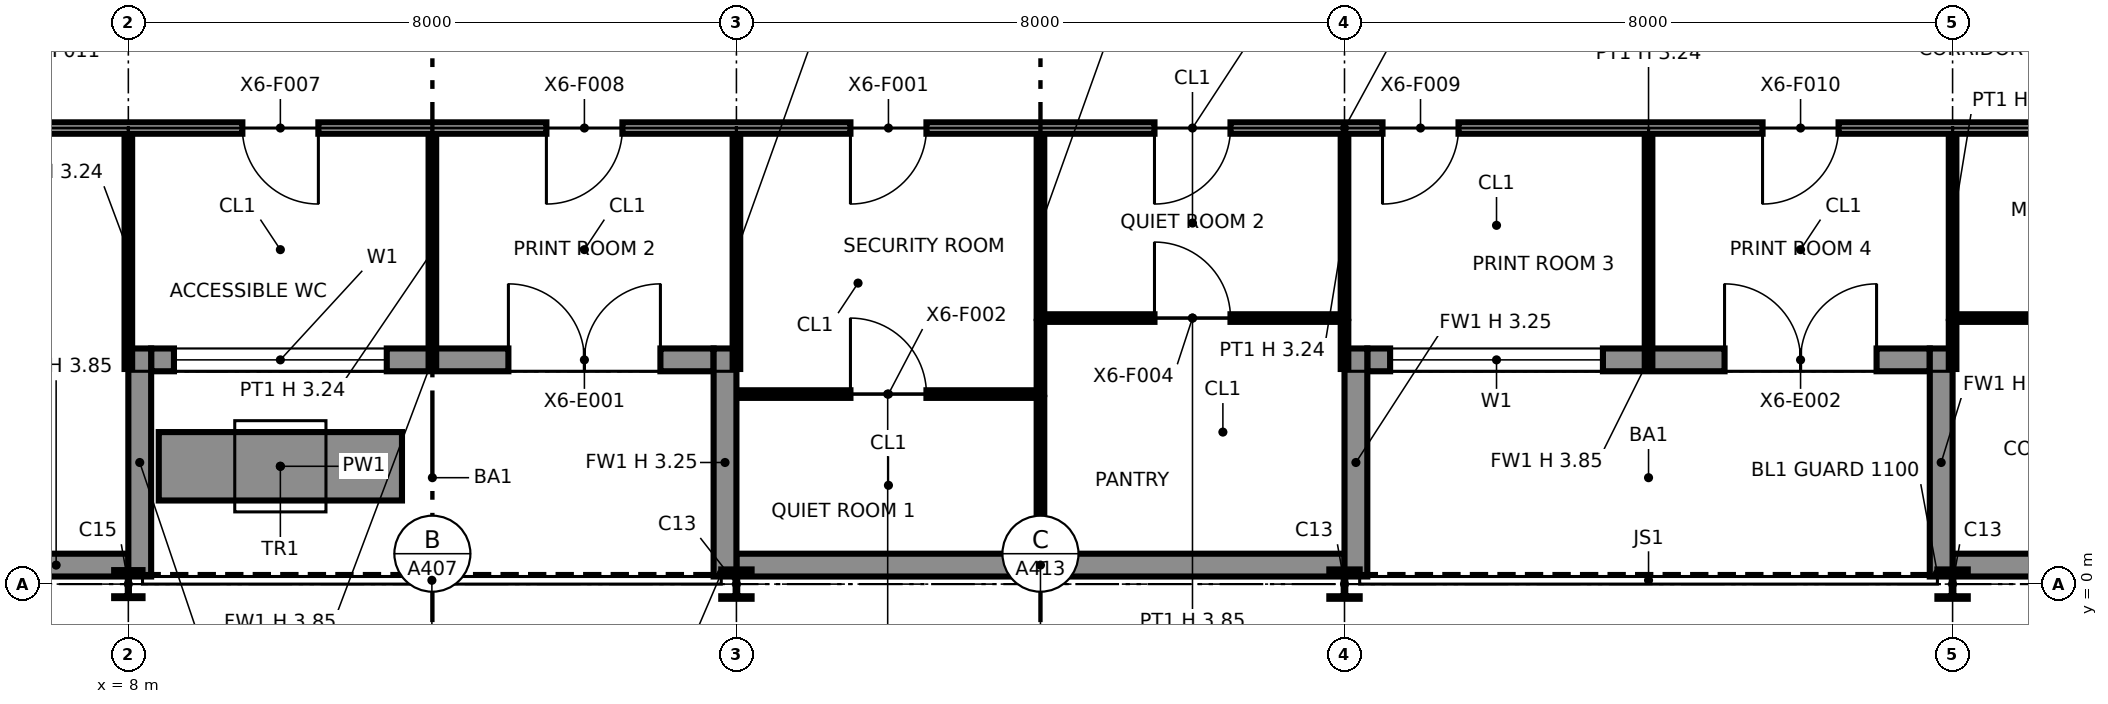
"""IFC4 building model, lengths in metres.
Left out: names, types, materials, properties, quantities, classifications, styles, units other than length and angle.
Written with IfcOpenShell. Run it as: python <this file> out.ifc"""

import sys

from ifc_helpers import new_model, si_unit, direction, frame, frame_2d, origin, origin_2d, place, context, subcontext, project, spatial, rectangle, i_section, extrude, element, fill, save


model = new_model("IFC4")
c1 = context("Model", 3, precision=1e-05, world=origin(), true_north=direction((0.0, 1.0)))
c2 = subcontext(c1, "Body", "Model", "MODEL_VIEW")
j1 = project(units=[si_unit("LENGTHUNIT", "METRE"), si_unit("PLANEANGLEUNIT", "RADIAN")], contexts=[c1])
p1 = place(None, origin())
s1 = spatial("IfcSite", under=j1, at=p1, CompositionType="ELEMENT")
p2 = place(p1, origin())
s2 = spatial("IfcBuilding", under=s1, at=p2, CompositionType="ELEMENT")
p3 = place(p2, frame((0.0, 0.0, 291.0)))
s3 = spatial("IfcBuildingStorey", under=s2, at=p3, CompositionType="ELEMENT", Elevation=291.0)
p4 = place(p3, frame((8.0, 0.0, 0.0), z_axis=(0.0, 0.0, 1.0), x_axis=(1.0, 0.0, 0.0)))
e1 = element("IfcColumn", 1, at=p4, inside=s3, PredefinedType="COLUMN", context=c2, shape_type="SweptSolid", body=[
    extrude(i_section(OverallWidth=0.373, OverallDepth=0.368, WebThickness=0.015, FlangeThickness=0.024, at=origin_2d()), origin(), (0.0, 0.0, 1.0), 3.85),
])
for number, where, z_axis, x_axis in (
    (2, (16.0, 0.0, 0.0), (0.0, 0.0, 1.0), (1.0, 0.0, 0.0)),
    (3, (24.0, 0.0, 0.0), (0.0, 0.0, 1.0), (1.0, 0.0, 0.0)),
    (4, (32.0, 0.0, 0.0), (0.0, 0.0, 1.0), (1.0, 0.0, 0.0)),
):
    element("IfcColumn", number, at=place(p3, frame(where, z_axis=z_axis, x_axis=x_axis)), inside=s3, PredefinedType="COLUMN", context=c2, shape_type="SweptSolid", body=[
        extrude(i_section(OverallWidth=0.399, OverallDepth=0.386, WebThickness=0.021, FlangeThickness=0.033, at=origin_2d()), origin(), (0.0, 0.0, 1.0), 3.85),
    ])
p5 = place(p3, frame((6.1, 0.25, 0.0), z_axis=(0.0, 0.0, 1.0), x_axis=(1.0, 0.0, 0.0)))
e5 = element("IfcWall", 5, at=p5, inside=s3, PredefinedType="SOLIDWALL", context=c2, shape_type="SweptSolid", body=[
    extrude(rectangle(XDim=1.9, YDim=0.3, at=frame_2d((0.95, 0.0))), origin(), (0.0, 0.0, 1.0), 3.85),
])
p6 = place(p3, frame((8.3, 2.95, 0.0), z_axis=(0.0, 0.0, 1.0), x_axis=(1.0, 0.0, 0.0)))
e6 = element("IfcWall", 6, at=p6, inside=s3, PredefinedType="SOLIDWALL", context=c2, shape_type="SweptSolid", body=[
    extrude(rectangle(XDim=7.4, YDim=0.3, at=frame_2d((3.7, 0.0))), origin(), (0.0, 0.0, 1.0), 3.85),
])
p7 = place(p6, frame((0.3, 0.0, 0.9)))
e7 = element("IfcOpeningElement", 7, at=p7, cuts=e6, PredefinedType="OPENING", context=c2, shape_type="SweptSolid", body=[
    extrude(rectangle(XDim=2.8, YDim=2.2, at=frame_2d((1.4, 1.1))), frame((0.0, 0.16, 0.0), z_axis=(0.0, -1.0, 0.0), x_axis=(1.0, 0.0, 0.0)), (0.0, 0.0, 1.0), 0.32),
])
p8 = place(p6, frame((4.7, 0.0, 0.0)))
e8 = element("IfcOpeningElement", 8, at=p8, cuts=e6, PredefinedType="OPENING", context=c2, shape_type="SweptSolid", body=[
    extrude(rectangle(XDim=2.0, YDim=2.4, at=frame_2d((1.0, 1.2))), frame((0.0, 0.16, 0.0), z_axis=(0.0, -1.0, 0.0), x_axis=(1.0, 0.0, 0.0)), (0.0, 0.0, 1.0), 0.32),
])
p9 = place(p3, frame((8.15, 0.1, 0.0), z_axis=(0.0, 0.0, 1.0), x_axis=(0.0, 1.0, 0.0)))
e9 = element("IfcWall", 9, at=p9, inside=s3, PredefinedType="SOLIDWALL", context=c2, shape_type="SweptSolid", body=[
    extrude(rectangle(XDim=3.0, YDim=0.3, at=frame_2d((1.5, 0.0))), origin(), (0.0, 0.0, 1.0), 3.237),
])
p10 = place(p3, frame((15.85, 0.1, 0.0), z_axis=(0.0, 0.0, 1.0), x_axis=(0.0, 1.0, 0.0)))
e10 = element("IfcWall", 10, at=p10, inside=s3, PredefinedType="SOLIDWALL", context=c2, shape_type="SweptSolid", body=[
    extrude(rectangle(XDim=3.0, YDim=0.3, at=frame_2d((1.5, 0.0))), origin(), (0.0, 0.0, 1.0), 3.247),
])
p11 = place(p3, frame((16.0, 0.25, 0.0), z_axis=(0.0, 0.0, 1.0), x_axis=(1.0, 0.0, 0.0)))
e11 = element("IfcWall", 11, at=p11, inside=s3, PredefinedType="SOLIDWALL", context=c2, shape_type="SweptSolid", body=[
    extrude(rectangle(XDim=8.0, YDim=0.3, at=frame_2d((4.0, 0.0))), origin(), (0.0, 0.0, 1.0), 3.85),
])
p12 = place(p3, frame((24.3, 2.95, 0.0), z_axis=(0.0, 0.0, 1.0), x_axis=(1.0, 0.0, 0.0)))
e12 = element("IfcWall", 12, at=p12, inside=s3, PredefinedType="SOLIDWALL", context=c2, shape_type="SweptSolid", body=[
    extrude(rectangle(XDim=7.4, YDim=0.3, at=frame_2d((3.7, 0.0))), origin(), (0.0, 0.0, 1.0), 3.85),
])
p13 = place(p12, frame((0.3, 0.0, 0.9)))
e13 = element("IfcOpeningElement", 13, at=p13, cuts=e12, PredefinedType="OPENING", context=c2, shape_type="SweptSolid", body=[
    extrude(rectangle(XDim=2.8, YDim=2.2, at=frame_2d((1.4, 1.1))), frame((0.0, 0.16, 0.0), z_axis=(0.0, -1.0, 0.0), x_axis=(1.0, 0.0, 0.0)), (0.0, 0.0, 1.0), 0.32),
])
p14 = place(p12, frame((4.7, 0.0, 0.0)))
e14 = element("IfcOpeningElement", 14, at=p14, cuts=e12, PredefinedType="OPENING", context=c2, shape_type="SweptSolid", body=[
    extrude(rectangle(XDim=2.0, YDim=2.4, at=frame_2d((1.0, 1.2))), frame((0.0, 0.16, 0.0), z_axis=(0.0, -1.0, 0.0), x_axis=(1.0, 0.0, 0.0)), (0.0, 0.0, 1.0), 0.32),
])
for number, where, z_axis, x_axis in (
    (15, (24.15, 0.1, 0.0), (0.0, 0.0, 1.0), (0.0, 1.0, 0.0)),
    (16, (31.85, 0.1, 0.0), (0.0, 0.0, 1.0), (0.0, 1.0, 0.0)),
):
    element("IfcWall", number, at=place(p3, frame(where, z_axis=z_axis, x_axis=x_axis)), inside=s3, PredefinedType="SOLIDWALL", context=c2, shape_type="SweptSolid", body=[
        extrude(rectangle(XDim=3.0, YDim=0.3, at=frame_2d((1.5, 0.0))), origin(), (0.0, 0.0, 1.0), 3.247),
    ])
p15 = place(p3, frame((32.0, 0.25, 0.0), z_axis=(0.0, 0.0, 1.0), x_axis=(1.0, 0.0, 0.0)))
e17 = element("IfcWall", 17, at=p15, inside=s3, PredefinedType="SOLIDWALL", context=c2, shape_type="SweptSolid", body=[
    extrude(rectangle(XDim=9.9, YDim=0.3, at=frame_2d((4.95, 0.0))), origin(), (0.0, 0.0, 1.0), 3.85),
])
p16 = place(p3, frame((8.4, 1.55, 0.0), z_axis=(0.0, 0.0, 1.0), x_axis=(1.0, 0.0, 0.0)))
e18 = element("IfcWall", 18, at=p16, inside=s3, PredefinedType="SOLIDWALL", context=c2, shape_type="SweptSolid", body=[
    extrude(rectangle(XDim=3.2, YDim=0.9, at=frame_2d((1.6, 0.0))), origin(), (0.0, 0.0, 1.0), 0.6),
])
p17 = place(p3, frame((20.0, 0.13, 0.0), z_axis=(0.0, 0.0, 1.0), x_axis=(0.0, 1.0, 0.0)))
e19 = element("IfcWall", 19, at=p17, inside=s3, PredefinedType="PARTITIONING", context=c2, shape_type="SweptSolid", body=[
    extrude(rectangle(XDim=2.32, YDim=0.1, at=frame_2d((1.16, 0.0))), origin(), (0.0, 0.0, 1.0), 3.85),
])
p18 = place(p3, frame((16.03, 2.5, 0.0), z_axis=(0.0, 0.0, 1.0), x_axis=(1.0, 0.0, 0.0)))
e20 = element("IfcWall", 20, at=p18, inside=s3, PredefinedType="PARTITIONING", context=c2, shape_type="SweptSolid", body=[
    extrude(rectangle(XDim=3.92, YDim=0.1, at=frame_2d((1.96, 0.0))), origin(), (0.0, 0.0, 1.0), 3.85),
])
p19 = place(p18, frame((1.47, 0.0, 0.0)))
e21 = element("IfcOpeningElement", 21, at=p19, cuts=e20, PredefinedType="OPENING", context=c2, shape_type="SweptSolid", body=[
    extrude(rectangle(XDim=1.0, YDim=2.1, at=frame_2d((0.5, 1.05))), frame((0.0, 0.06, 0.0), z_axis=(0.0, -1.0, 0.0), x_axis=(1.0, 0.0, 0.0)), (0.0, 0.0, 1.0), 0.12),
])
p20 = place(p3, frame((20.0, 2.5, 0.0), z_axis=(0.0, 0.0, 1.0), x_axis=(0.0, 1.0, 0.0)))
e22 = element("IfcWall", 22, at=p20, inside=s3, PredefinedType="PARTITIONING", context=c2, shape_type="SweptSolid", body=[
    extrude(rectangle(XDim=0.95, YDim=0.1, at=frame_2d((0.475, 0.0))), origin(), (0.0, 0.0, 1.0), 3.85),
])
for number, where, z_axis, x_axis in (
    (23, (8.0, 2.83, 0.0), (0.0, 0.0, 1.0), (0.0, 1.0, 0.0)),
    (24, (12.0, 2.83, 0.0), (0.0, 0.0, 1.0), (0.0, 1.0, 0.0)),
    (25, (16.0, 2.83, 0.0), (0.0, 0.0, 1.0), (0.0, 1.0, 0.0)),
):
    element("IfcWall", number, at=place(p3, frame(where, z_axis=z_axis, x_axis=x_axis)), inside=s3, PredefinedType="PARTITIONING", context=c2, shape_type="SweptSolid", body=[
        extrude(rectangle(XDim=3.095, YDim=0.1, at=frame_2d((1.547, 0.0))), origin(), (0.0, 0.0, 1.0), 3.238),
    ])
p21 = place(p3, frame((24.0, 2.83, 0.0), z_axis=(0.0, 0.0, 1.0), x_axis=(0.0, 1.0, 0.0)))
e26 = element("IfcWall", 26, at=p21, inside=s3, PredefinedType="PARTITIONING", context=c2, shape_type="SweptSolid", body=[
    extrude(rectangle(XDim=0.62, YDim=0.1, at=frame_2d((0.31, 0.0))), origin(), (0.0, 0.0, 1.0), 3.238),
])
p22 = place(p3, frame((28.0, 2.83, 0.0), z_axis=(0.0, 0.0, 1.0), x_axis=(0.0, 1.0, 0.0)))
e27 = element("IfcWall", 27, at=p22, inside=s3, PredefinedType="PARTITIONING", context=c2, shape_type="SweptSolid", body=[
    extrude(rectangle(XDim=3.095, YDim=0.1, at=frame_2d((1.547, 0.0))), origin(), (0.0, 0.0, 1.0), 3.238),
])
p23 = place(p3, frame((32.0, 2.83, 0.0), z_axis=(0.0, 0.0, 1.0), x_axis=(0.0, 1.0, 0.0)))
e28 = element("IfcWall", 28, at=p23, inside=s3, PredefinedType="PARTITIONING", context=c2, shape_type="SweptSolid", body=[
    extrude(rectangle(XDim=0.62, YDim=0.1, at=frame_2d((0.31, 0.0))), origin(), (0.0, 0.0, 1.0), 3.238),
])
p24 = place(p3, frame((20.05, 3.5, 0.0), z_axis=(0.0, 0.0, 1.0), x_axis=(1.0, 0.0, 0.0)))
e29 = element("IfcWall", 29, at=p24, inside=s3, PredefinedType="PARTITIONING", context=c2, shape_type="SweptSolid", body=[
    extrude(rectangle(XDim=3.9, YDim=0.1, at=frame_2d((1.95, 0.0))), origin(), (0.0, 0.0, 1.0), 3.85),
])
p25 = place(p24, frame((1.45, 0.0, 0.0)))
e30 = element("IfcOpeningElement", 30, at=p25, cuts=e29, PredefinedType="OPENING", context=c2, shape_type="SweptSolid", body=[
    extrude(rectangle(XDim=1.0, YDim=2.1, at=frame_2d((0.5, 1.05))), frame((0.0, 0.06, 0.0), z_axis=(0.0, -1.0, 0.0), x_axis=(1.0, 0.0, 0.0)), (0.0, 0.0, 1.0), 0.12),
])
for number, where, z_axis, x_axis in (
    (31, (20.0, 3.5, 0.0), (0.0, 0.0, 1.0), (0.0, 1.0, 0.0)),
    (32, (24.0, 3.5, 0.0), (0.0, 0.0, 1.0), (0.0, 1.0, 0.0)),
):
    element("IfcWall", number, at=place(p3, frame(where, z_axis=z_axis, x_axis=x_axis)), inside=s3, PredefinedType="PARTITIONING", context=c2, shape_type="SweptSolid", body=[
        extrude(rectangle(XDim=2.425, YDim=0.1, at=frame_2d((1.212, 0.0))), origin(), (0.0, 0.0, 1.0), 3.238),
    ])
p26 = place(p3, frame((32.05, 3.5, 0.0), z_axis=(0.0, 0.0, 1.0), x_axis=(1.0, 0.0, 0.0)))
e33 = element("IfcWall", 33, at=p26, inside=s3, PredefinedType="PARTITIONING", context=c2, shape_type="SweptSolid", body=[
    extrude(rectangle(XDim=7.9, YDim=0.1, at=frame_2d((3.95, 0.0))), origin(), (0.0, 0.0, 1.0), 3.85),
])
p27 = place(p26, frame((3.45, 0.0, 0.0)))
e34 = element("IfcOpeningElement", 34, at=p27, cuts=e33, PredefinedType="OPENING", context=c2, shape_type="SweptSolid", body=[
    extrude(rectangle(XDim=1.0, YDim=2.1, at=frame_2d((0.5, 1.05))), frame((0.0, 0.06, 0.0), z_axis=(0.0, -1.0, 0.0), x_axis=(1.0, 0.0, 0.0)), (0.0, 0.0, 1.0), 0.12),
])
p28 = place(p3, frame((32.0, 3.5, 0.0), z_axis=(0.0, 0.0, 1.0), x_axis=(0.0, 1.0, 0.0)))
e35 = element("IfcWall", 35, at=p28, inside=s3, PredefinedType="PARTITIONING", context=c2, shape_type="SweptSolid", body=[
    extrude(rectangle(XDim=2.425, YDim=0.1, at=frame_2d((1.212, 0.0))), origin(), (0.0, 0.0, 1.0), 3.238),
])
p29 = place(p3, frame((6.075, 6.0, 0.0), z_axis=(0.0, 0.0, 1.0), x_axis=(1.0, 0.0, 0.0)))
e36 = element("IfcWall", 36, at=p29, inside=s3, PredefinedType="PARTITIONING", context=c2, shape_type="SweptSolid", body=[
    extrude(rectangle(XDim=35.85, YDim=0.15, at=frame_2d((17.925, 0.0))), origin(), (0.0, 0.0, 1.0), 3.85),
])
p30 = place(p29, frame((12.425, 0.0, 0.0), z_axis=(0.0, 0.0, 1.0), x_axis=(-1.0, 0.0, 0.0)))
e37 = element("IfcOpeningElement", 37, at=p30, cuts=e36, PredefinedType="OPENING", context=c2, shape_type="SweptSolid", body=[
    extrude(rectangle(XDim=1.0, YDim=2.1, at=frame_2d((0.5, 1.05))), frame((0.0, 0.085, 0.0), z_axis=(0.0, -1.0, 0.0), x_axis=(1.0, 0.0, 0.0)), (0.0, 0.0, 1.0), 0.17),
])
p31 = place(p29, frame((16.425, 0.0, 0.0), z_axis=(0.0, 0.0, 1.0), x_axis=(-1.0, 0.0, 0.0)))
e38 = element("IfcOpeningElement", 38, at=p31, cuts=e36, PredefinedType="OPENING", context=c2, shape_type="SweptSolid", body=[
    extrude(rectangle(XDim=1.0, YDim=2.1, at=frame_2d((0.5, 1.05))), frame((0.0, 0.085, 0.0), z_axis=(0.0, -1.0, 0.0), x_axis=(1.0, 0.0, 0.0)), (0.0, 0.0, 1.0), 0.17),
])
p32 = place(p29, frame((30.425, 0.0, 0.0), z_axis=(0.0, 0.0, 1.0), x_axis=(-1.0, 0.0, 0.0)))
e39 = element("IfcOpeningElement", 39, at=p32, cuts=e36, PredefinedType="OPENING", context=c2, shape_type="SweptSolid", body=[
    extrude(rectangle(XDim=1.0, YDim=2.1, at=frame_2d((0.5, 1.05))), frame((0.0, 0.085, 0.0), z_axis=(0.0, -1.0, 0.0), x_axis=(1.0, 0.0, 0.0)), (0.0, 0.0, 1.0), 0.17),
])
p33 = place(p29, frame((4.425, 0.0, 0.0), z_axis=(0.0, 0.0, 1.0), x_axis=(-1.0, 0.0, 0.0)))
e40 = element("IfcOpeningElement", 40, at=p33, cuts=e36, PredefinedType="OPENING", context=c2, shape_type="SweptSolid", body=[
    extrude(rectangle(XDim=1.0, YDim=2.1, at=frame_2d((0.5, 1.05))), frame((0.0, 0.085, 0.0), z_axis=(0.0, -1.0, 0.0), x_axis=(1.0, 0.0, 0.0)), (0.0, 0.0, 1.0), 0.17),
])
p34 = place(p29, frame((8.425, 0.0, 0.0), z_axis=(0.0, 0.0, 1.0), x_axis=(-1.0, 0.0, 0.0)))
e41 = element("IfcOpeningElement", 41, at=p34, cuts=e36, PredefinedType="OPENING", context=c2, shape_type="SweptSolid", body=[
    extrude(rectangle(XDim=1.0, YDim=2.1, at=frame_2d((0.5, 1.05))), frame((0.0, 0.085, 0.0), z_axis=(0.0, -1.0, 0.0), x_axis=(1.0, 0.0, 0.0)), (0.0, 0.0, 1.0), 0.17),
])
p35 = place(p29, frame((19.425, 0.0, 0.0), z_axis=(0.0, 0.0, 1.0), x_axis=(-1.0, 0.0, 0.0)))
e42 = element("IfcOpeningElement", 42, at=p35, cuts=e36, PredefinedType="OPENING", context=c2, shape_type="SweptSolid", body=[
    extrude(rectangle(XDim=1.0, YDim=2.1, at=frame_2d((0.5, 1.05))), frame((0.0, 0.085, 0.0), z_axis=(0.0, -1.0, 0.0), x_axis=(1.0, 0.0, 0.0)), (0.0, 0.0, 1.0), 0.17),
])
p36 = place(p29, frame((24.425, 0.0, 0.0), z_axis=(0.0, 0.0, 1.0), x_axis=(-1.0, 0.0, 0.0)))
e43 = element("IfcOpeningElement", 43, at=p36, cuts=e36, PredefinedType="OPENING", context=c2, shape_type="SweptSolid", body=[
    extrude(rectangle(XDim=1.0, YDim=2.1, at=frame_2d((0.5, 1.05))), frame((0.0, 0.085, 0.0), z_axis=(0.0, -1.0, 0.0), x_axis=(1.0, 0.0, 0.0)), (0.0, 0.0, 1.0), 0.17),
])
p37 = place(p29, frame((35.425, 0.0, 0.0), z_axis=(0.0, 0.0, 1.0), x_axis=(-1.0, 0.0, 0.0)))
e44 = element("IfcOpeningElement", 44, at=p37, cuts=e36, PredefinedType="OPENING", context=c2, shape_type="SweptSolid", body=[
    extrude(rectangle(XDim=1.0, YDim=2.1, at=frame_2d((0.5, 1.05))), frame((0.0, 0.085, 0.0), z_axis=(0.0, -1.0, 0.0), x_axis=(1.0, 0.0, 0.0)), (0.0, 0.0, 1.0), 0.17),
])
p38 = place(p7, origin())
e45 = element("IfcWindow", 45, at=p38, inside=s3, PartitioningType="SINGLE_PANEL", PredefinedType="WINDOW", context=c2, shape_type="SweptSolid", body=[
    extrude(rectangle(XDim=2.8, YDim=2.2, at=frame_2d((1.4, 1.1))), frame((0.0, 0.03, 0.0), z_axis=(0.0, -1.0, 0.0), x_axis=(1.0, 0.0, 0.0)), (0.0, 0.0, 1.0), 0.06),
])
fill(e7, e45)
p39 = place(p8, origin())
e46 = element("IfcDoor", 46, at=p39, inside=s3, OperationType="DOUBLE_DOOR_SINGLE_SWING", PredefinedType="DOOR", context=c2, shape_type="SweptSolid", body=[
    extrude(rectangle(XDim=2.0, YDim=2.4, at=frame_2d((1.0, 1.2))), frame((0.0, 0.025, 0.0), z_axis=(0.0, -1.0, 0.0), x_axis=(1.0, 0.0, 0.0)), (0.0, 0.0, 1.0), 0.05),
])
fill(e8, e46)
p40 = place(p13, origin())
e47 = element("IfcWindow", 47, at=p40, inside=s3, PartitioningType="SINGLE_PANEL", PredefinedType="WINDOW", context=c2, shape_type="SweptSolid", body=[
    extrude(rectangle(XDim=2.8, YDim=2.2, at=frame_2d((1.4, 1.1))), frame((0.0, 0.03, 0.0), z_axis=(0.0, -1.0, 0.0), x_axis=(1.0, 0.0, 0.0)), (0.0, 0.0, 1.0), 0.06),
])
fill(e13, e47)
p41 = place(p14, origin())
e48 = element("IfcDoor", 48, at=p41, inside=s3, OperationType="DOUBLE_DOOR_SINGLE_SWING", PredefinedType="DOOR", context=c2, shape_type="SweptSolid", body=[
    extrude(rectangle(XDim=2.0, YDim=2.4, at=frame_2d((1.0, 1.2))), frame((0.0, 0.025, 0.0), z_axis=(0.0, -1.0, 0.0), x_axis=(1.0, 0.0, 0.0)), (0.0, 0.0, 1.0), 0.05),
])
fill(e14, e48)
p42 = place(p30, origin())
e49 = element("IfcDoor", 49, at=p42, inside=s3, OperationType="SINGLE_SWING_RIGHT", PredefinedType="DOOR", context=c2, shape_type="SweptSolid", body=[
    extrude(rectangle(XDim=1.0, YDim=2.1, at=frame_2d((0.5, 1.05))), frame((0.0, 0.025, 0.0), z_axis=(0.0, -1.0, 0.0), x_axis=(1.0, 0.0, 0.0)), (0.0, 0.0, 1.0), 0.05),
])
fill(e37, e49)
p43 = place(p19, origin())
e50 = element("IfcDoor", 50, at=p43, inside=s3, OperationType="SINGLE_SWING_LEFT", PredefinedType="DOOR", context=c2, shape_type="SweptSolid", body=[
    extrude(rectangle(XDim=1.0, YDim=2.1, at=frame_2d((0.5, 1.05))), frame((0.0, 0.025, 0.0), z_axis=(0.0, -1.0, 0.0), x_axis=(1.0, 0.0, 0.0)), (0.0, 0.0, 1.0), 0.05),
])
fill(e21, e50)
p44 = place(p31, origin())
e51 = element("IfcDoor", 51, at=p44, inside=s3, OperationType="SINGLE_SWING_RIGHT", PredefinedType="DOOR", context=c2, shape_type="SweptSolid", body=[
    extrude(rectangle(XDim=1.0, YDim=2.1, at=frame_2d((0.5, 1.05))), frame((0.0, 0.025, 0.0), z_axis=(0.0, -1.0, 0.0), x_axis=(1.0, 0.0, 0.0)), (0.0, 0.0, 1.0), 0.05),
])
fill(e38, e51)
p45 = place(p25, origin())
e52 = element("IfcDoor", 52, at=p45, inside=s3, OperationType="SINGLE_SWING_LEFT", PredefinedType="DOOR", context=c2, shape_type="SweptSolid", body=[
    extrude(rectangle(XDim=1.0, YDim=2.1, at=frame_2d((0.5, 1.05))), frame((0.0, 0.025, 0.0), z_axis=(0.0, -1.0, 0.0), x_axis=(1.0, 0.0, 0.0)), (0.0, 0.0, 1.0), 0.05),
])
fill(e30, e52)
p46 = place(p33, origin())
e53 = element("IfcDoor", 53, at=p46, inside=s3, OperationType="SINGLE_SWING_LEFT", PredefinedType="DOOR", context=c2, shape_type="SweptSolid", body=[
    extrude(rectangle(XDim=1.0, YDim=2.1, at=frame_2d((0.5, 1.05))), frame((0.0, 0.025, 0.0), z_axis=(0.0, -1.0, 0.0), x_axis=(1.0, 0.0, 0.0)), (0.0, 0.0, 1.0), 0.05),
])
fill(e40, e53)
p47 = place(p34, origin())
e54 = element("IfcDoor", 54, at=p47, inside=s3, OperationType="SINGLE_SWING_RIGHT", PredefinedType="DOOR", context=c2, shape_type="SweptSolid", body=[
    extrude(rectangle(XDim=1.0, YDim=2.1, at=frame_2d((0.5, 1.05))), frame((0.0, 0.025, 0.0), z_axis=(0.0, -1.0, 0.0), x_axis=(1.0, 0.0, 0.0)), (0.0, 0.0, 1.0), 0.05),
])
fill(e41, e54)
p48 = place(p35, origin())
e55 = element("IfcDoor", 55, at=p48, inside=s3, OperationType="SINGLE_SWING_RIGHT", PredefinedType="DOOR", context=c2, shape_type="SweptSolid", body=[
    extrude(rectangle(XDim=1.0, YDim=2.1, at=frame_2d((0.5, 1.05))), frame((0.0, 0.025, 0.0), z_axis=(0.0, -1.0, 0.0), x_axis=(1.0, 0.0, 0.0)), (0.0, 0.0, 1.0), 0.05),
])
fill(e42, e55)
p49 = place(p36, origin())
e56 = element("IfcDoor", 56, at=p49, inside=s3, OperationType="SINGLE_SWING_RIGHT", PredefinedType="DOOR", context=c2, shape_type="SweptSolid", body=[
    extrude(rectangle(XDim=1.0, YDim=2.1, at=frame_2d((0.5, 1.05))), frame((0.0, 0.025, 0.0), z_axis=(0.0, -1.0, 0.0), x_axis=(1.0, 0.0, 0.0)), (0.0, 0.0, 1.0), 0.05),
])
fill(e43, e56)
save(model, sys.argv[1])
